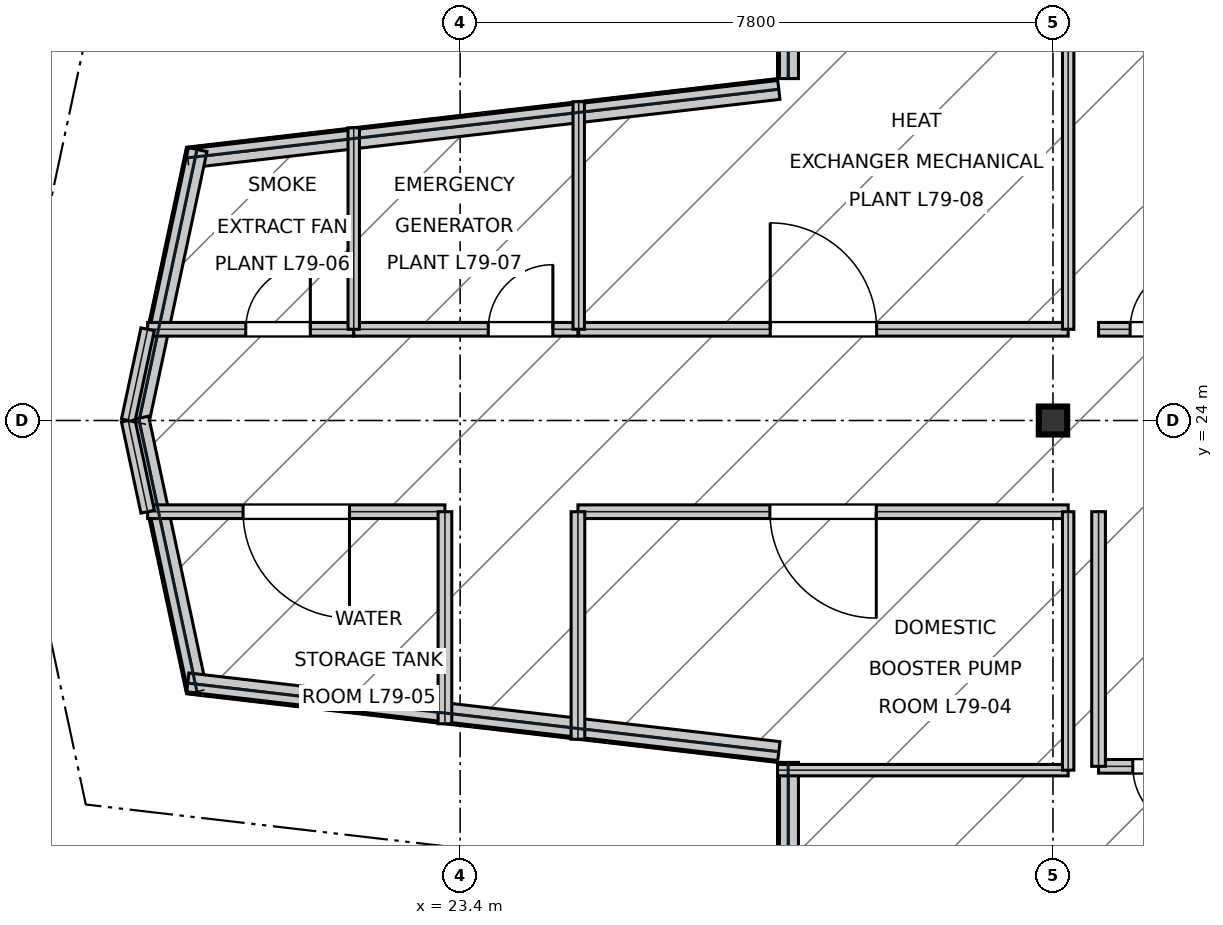
"""IFC4 building model, lengths in metres.
Left out: names, types, materials, properties, quantities, classifications, styles, units other than length and angle.
Written with IfcOpenShell. Run it as: python <this file> out.ifc"""

import sys

from ifc_helpers import new_model, si_unit, direction, frame, frame_2d, origin, origin_2d, place, context, subcontext, project, spatial, rectangle, i_section, extrude, element, fill, save


model = new_model("IFC4")
c1 = context("Model", 3, precision=1e-05, world=origin(), true_north=direction((0.0, 1.0)))
c2 = subcontext(c1, "Body", "Model", "MODEL_VIEW")
j1 = project(units=[si_unit("LENGTHUNIT", "METRE"), si_unit("PLANEANGLEUNIT", "RADIAN")], contexts=[c1])
p1 = place(None, origin())
s1 = spatial("IfcSite", under=j1, at=p1, CompositionType="ELEMENT")
p2 = place(p1, origin())
s2 = spatial("IfcBuilding", under=s1, at=p2, CompositionType="ELEMENT")
p3 = place(p2, frame((0.0, 0.0, 336.9)))
s3 = spatial("IfcBuildingStorey", under=s2, at=p3, CompositionType="ELEMENT", Elevation=336.9)
p4 = place(p3, frame((31.2, 24.0, 0.0), z_axis=(0.0, 0.0, 1.0), x_axis=(1.0, 0.0, 0.0)))
e1 = element("IfcColumn", 1, at=p4, inside=s3, PredefinedType="COLUMN", context=c2, shape_type="SweptSolid", body=[
    extrude(i_section(OverallWidth=0.373, OverallDepth=0.368, WebThickness=0.015, FlangeThickness=0.024, at=origin_2d()), origin(), (0.0, 0.0, 1.0), 4.444),
])
p5 = place(p3, frame((27.726, 32.0, 4.45), z_axis=(0.0, 0.0, 1.0), x_axis=(0.0, -1.0, 0.0)))
e2 = element("IfcWall", 2, at=p5, inside=s3, PredefinedType="PARAPET", context=c2, shape_type="SweptSolid", body=[
    extrude(rectangle(XDim=3.502, YDim=0.25, at=frame_2d((1.751, 0.0))), origin(), (0.0, 0.0, 1.0), 1.1),
])
p6 = place(p3, frame((27.593, 28.349, 4.45), z_axis=(0.0, 0.0, 1.0), x_axis=(-0.993323430456, -0.115362743148, 0.0)))
e3 = element("IfcWall", 3, at=p6, inside=s3, PredefinedType="PARAPET", context=c2, shape_type="SweptSolid", body=[
    extrude(rectangle(XDim=7.828, YDim=0.25, at=frame_2d((3.914, 0.0))), origin(), (0.0, 0.0, 1.0), 1.1),
])
for number, where, z_axis, x_axis in (
    (4, (19.947, 27.564, 4.45), (0.0, 0.0, 1.0), (-0.209, -0.978, 0.0)),
    (5, (19.179, 24.031, 4.45), (0.0, 0.0, 1.0), (0.209, -0.978, 0.0)),
):
    element("IfcWall", number, at=place(p3, frame(where, z_axis=z_axis, x_axis=x_axis)), inside=s3, PredefinedType="PARAPET", context=c2, shape_type="SweptSolid", body=[
        extrude(rectangle(XDim=3.676, YDim=0.25, at=frame_2d((1.838, 0.0))), origin(), (0.0, 0.0, 1.0), 1.1),
    ])
p7 = place(p3, frame((19.817, 20.554, 4.45), z_axis=(0.0, 0.0, 1.0), x_axis=(0.993323430456, -0.115362743148, 0.0)))
e6 = element("IfcWall", 6, at=p7, inside=s3, PredefinedType="PARAPET", context=c2, shape_type="SweptSolid", body=[
    extrude(rectangle(XDim=7.828, YDim=0.25, at=frame_2d((3.914, 0.0))), origin(), (0.0, 0.0, 1.0), 1.1),
])
p8 = place(p3, frame((27.726, 19.502, 4.45), z_axis=(0.0, 0.0, 1.0), x_axis=(0.0, -1.0, 0.0)))
e7 = element("IfcWall", 7, at=p8, inside=s3, PredefinedType="PARAPET", context=c2, shape_type="SweptSolid", body=[
    extrude(rectangle(XDim=3.502, YDim=0.25, at=frame_2d((1.751, 0.0))), origin(), (0.0, 0.0, 1.0), 1.1),
])
p9 = place(p3, frame((31.8, 19.45, 0.0), z_axis=(0.0, 0.0, 1.0), x_axis=(1.0, 0.0, 0.0)))
e8 = element("IfcWall", 8, at=p9, inside=s3, PredefinedType="SOLIDWALL", context=c2, shape_type="SweptSolid", body=[
    extrude(rectangle(XDim=1.75, YDim=0.18, at=frame_2d((0.875, 0.0))), origin(), (0.0, 0.0, 1.0), 4.22),
])
p10 = place(p9, frame((0.45, 0.0, 0.0)))
e9 = element("IfcOpeningElement", 9, at=p10, cuts=e8, PredefinedType="OPENING", context=c2, shape_type="SweptSolid", body=[
    extrude(rectangle(XDim=0.85, YDim=2.15, at=frame_2d((0.425, 1.075))), frame((0.0, 0.1, 0.0), z_axis=(0.0, -1.0, 0.0), x_axis=(1.0, 0.0, 0.0)), (0.0, 0.0, 1.0), 0.2),
])
p11 = place(p3, frame((24.95, 22.8, 0.0), z_axis=(0.0, 0.0, 1.0), x_axis=(1.0, 0.0, 0.0)))
e10 = element("IfcWall", 10, at=p11, inside=s3, PredefinedType="SOLIDWALL", context=c2, shape_type="SweptSolid", body=[
    extrude(rectangle(XDim=6.45, YDim=0.18, at=frame_2d((3.225, 0.0))), origin(), (0.0, 0.0, 1.0), 3.63),
])
p12 = place(p11, frame((2.525, 0.0, 0.0)))
e11 = element("IfcOpeningElement", 11, at=p12, cuts=e10, PredefinedType="OPENING", context=c2, shape_type="SweptSolid", body=[
    extrude(rectangle(XDim=1.4, YDim=2.2, at=frame_2d((0.7, 1.1))), frame((0.0, 0.1, 0.0), z_axis=(0.0, -1.0, 0.0), x_axis=(1.0, 0.0, 0.0)), (0.0, 0.0, 1.0), 0.2),
])
p13 = place(p3, frame((19.288, 22.8, 0.0), z_axis=(0.0, 0.0, 1.0), x_axis=(1.0, 0.0, 0.0)))
e12 = element("IfcWall", 12, at=p13, inside=s3, PredefinedType="SOLIDWALL", context=c2, shape_type="SweptSolid", body=[
    extrude(rectangle(XDim=3.912, YDim=0.18, at=frame_2d((1.956, 0.0))), origin(), (0.0, 0.0, 1.0), 3.9),
])
p14 = place(p13, frame((1.256, 0.0, 0.0)))
e13 = element("IfcOpeningElement", 13, at=p14, cuts=e12, PredefinedType="OPENING", context=c2, shape_type="SweptSolid", body=[
    extrude(rectangle(XDim=1.4, YDim=2.2, at=frame_2d((0.7, 1.1))), frame((0.0, 0.1, 0.0), z_axis=(0.0, -1.0, 0.0), x_axis=(1.0, 0.0, 0.0)), (0.0, 0.0, 1.0), 0.2),
])
p15 = place(p3, frame((19.288, 25.2, 0.0), z_axis=(0.0, 0.0, 1.0), x_axis=(1.0, 0.0, 0.0)))
e14 = element("IfcWall", 14, at=p15, inside=s3, PredefinedType="SOLIDWALL", context=c2, shape_type="SweptSolid", body=[
    extrude(rectangle(XDim=2.712, YDim=0.18, at=frame_2d((1.356, 0.0))), origin(), (0.0, 0.0, 1.0), 4.22),
])
p16 = place(p15, frame((1.291, 0.0, 0.0)))
e15 = element("IfcOpeningElement", 15, at=p16, cuts=e14, PredefinedType="OPENING", context=c2, shape_type="SweptSolid", body=[
    extrude(rectangle(XDim=0.85, YDim=2.15, at=frame_2d((0.425, 1.075))), frame((0.0, 0.1, 0.0), z_axis=(0.0, -1.0, 0.0), x_axis=(1.0, 0.0, 0.0)), (0.0, 0.0, 1.0), 0.2),
])
p17 = place(p3, frame((22.0, 25.2, 0.0), z_axis=(0.0, 0.0, 1.0), x_axis=(1.0, 0.0, 0.0)))
e16 = element("IfcWall", 16, at=p17, inside=s3, PredefinedType="SOLIDWALL", context=c2, shape_type="SweptSolid", body=[
    extrude(rectangle(XDim=2.95, YDim=0.18, at=frame_2d((1.475, 0.0))), origin(), (0.0, 0.0, 1.0), 3.63),
])
p18 = place(p17, frame((1.77, 0.0, 0.0)))
e17 = element("IfcOpeningElement", 17, at=p18, cuts=e16, PredefinedType="OPENING", context=c2, shape_type="SweptSolid", body=[
    extrude(rectangle(XDim=0.85, YDim=2.15, at=frame_2d((0.425, 1.075))), frame((0.0, 0.1, 0.0), z_axis=(0.0, -1.0, 0.0), x_axis=(1.0, 0.0, 0.0)), (0.0, 0.0, 1.0), 0.2),
])
p19 = place(p3, frame((24.96, 25.2, 0.0), z_axis=(0.0, 0.0, 1.0), x_axis=(1.0, 0.0, 0.0)))
e18 = element("IfcWall", 18, at=p19, inside=s3, PredefinedType="SOLIDWALL", context=c2, shape_type="SweptSolid", body=[
    extrude(rectangle(XDim=6.44, YDim=0.18, at=frame_2d((3.22, 0.0))), origin(), (0.0, 0.0, 1.0), 3.63),
])
p20 = place(p19, frame((2.52, 0.0, 0.0)))
e19 = element("IfcOpeningElement", 19, at=p20, cuts=e18, PredefinedType="OPENING", context=c2, shape_type="SweptSolid", body=[
    extrude(rectangle(XDim=1.4, YDim=2.2, at=frame_2d((0.7, 1.1))), frame((0.0, 0.1, 0.0), z_axis=(0.0, -1.0, 0.0), x_axis=(1.0, 0.0, 0.0)), (0.0, 0.0, 1.0), 0.2),
])
p21 = place(p3, frame((31.8, 25.2, 0.0), z_axis=(0.0, 0.0, 1.0), x_axis=(1.0, 0.0, 0.0)))
e20 = element("IfcWall", 20, at=p21, inside=s3, PredefinedType="SOLIDWALL", context=c2, shape_type="SweptSolid", body=[
    extrude(rectangle(XDim=2.4, YDim=0.18, at=frame_2d((1.2, 0.0))), origin(), (0.0, 0.0, 1.0), 4.22),
])
p22 = place(p21, frame((0.415, 0.0, 0.0)))
e21 = element("IfcOpeningElement", 21, at=p22, cuts=e20, PredefinedType="OPENING", context=c2, shape_type="SweptSolid", body=[
    extrude(rectangle(XDim=0.85, YDim=2.15, at=frame_2d((0.425, 1.075))), frame((0.0, 0.1, 0.0), z_axis=(0.0, -1.0, 0.0), x_axis=(1.0, 0.0, 0.0)), (0.0, 0.0, 1.0), 0.2),
])
p23 = place(p3, frame((31.8, 19.45, 0.0), z_axis=(0.0, 0.0, 1.0), x_axis=(0.0, 1.0, 0.0)))
e22 = element("IfcWall", 22, at=p23, inside=s3, PredefinedType="SOLIDWALL", context=c2, shape_type="SweptSolid", body=[
    extrude(rectangle(XDim=3.35, YDim=0.18, at=frame_2d((1.675, 0.0))), origin(), (0.0, 0.0, 1.0), 3.9),
])
p24 = place(p3, frame((24.95, 19.807, 0.0), z_axis=(0.0, 0.0, 1.0), x_axis=(0.0, 1.0, 0.0)))
e23 = element("IfcWall", 23, at=p24, inside=s3, PredefinedType="SOLIDWALL", context=c2, shape_type="SweptSolid", body=[
    extrude(rectangle(XDim=2.993, YDim=0.18, at=frame_2d((1.497, 0.0))), origin(), (0.0, 0.0, 1.0), 3.63),
])
p25 = place(p3, frame((23.2, 20.01, 0.0), z_axis=(0.0, 0.0, 1.0), x_axis=(0.0, 1.0, 0.0)))
e24 = element("IfcWall", 24, at=p25, inside=s3, PredefinedType="SOLIDWALL", context=c2, shape_type="SweptSolid", body=[
    extrude(rectangle(XDim=2.79, YDim=0.18, at=frame_2d((1.395, 0.0))), origin(), (0.0, 0.0, 1.0), 3.63),
])
for number, where, z_axis, x_axis in (
    (25, (19.032, 24.0, 0.0), (0.0, 0.0, 1.0), (0.209, -0.978, 0.0)),
    (26, (19.032, 24.0, 0.0), (0.0, 0.0, 1.0), (0.209, 0.978, 0.0)),
):
    element("IfcWall", number, at=place(p3, frame(where, z_axis=z_axis, x_axis=x_axis)), inside=s3, PredefinedType="SOLIDWALL", context=c2, shape_type="SweptSolid", body=[
        extrude(rectangle(XDim=1.227, YDim=0.18, at=frame_2d((0.614, 0.0))), origin(), (0.0, 0.0, 1.0), 4.22),
    ])
p26 = place(p3, frame((27.576, 19.4, 0.0), z_axis=(0.0, 0.0, 1.0), x_axis=(1.0, 0.0, 0.0)))
e27 = element("IfcWall", 27, at=p26, inside=s3, PredefinedType="MOVABLE", context=c2, shape_type="SweptSolid", body=[
    extrude(rectangle(XDim=3.824, YDim=0.15, at=frame_2d((1.912, 0.0))), origin(), (0.0, 0.0, 1.0), 3.63),
])
p27 = place(p3, frame((31.4, 19.4, 0.0), z_axis=(0.0, 0.0, 1.0), x_axis=(0.0, 1.0, 0.0)))
e28 = element("IfcWall", 28, at=p27, inside=s3, PredefinedType="MOVABLE", context=c2, shape_type="SweptSolid", body=[
    extrude(rectangle(XDim=3.4, YDim=0.15, at=frame_2d((1.7, 0.0))), origin(), (0.0, 0.0, 1.0), 3.63),
])
p28 = place(p3, frame((22.0, 25.2, 0.0), z_axis=(0.0, 0.0, 1.0), x_axis=(0.0, 1.0, 0.0)))
e29 = element("IfcWall", 29, at=p28, inside=s3, PredefinedType="MOVABLE", context=c2, shape_type="SweptSolid", body=[
    extrude(rectangle(XDim=2.651, YDim=0.15, at=frame_2d((1.325, 0.0))), origin(), (0.0, 0.0, 1.0), 3.63),
])
p29 = place(p3, frame((24.96, 25.2, 0.0), z_axis=(0.0, 0.0, 1.0), x_axis=(0.0, 1.0, 0.0)))
e30 = element("IfcWall", 30, at=p29, inside=s3, PredefinedType="MOVABLE", context=c2, shape_type="SweptSolid", body=[
    extrude(rectangle(XDim=2.994, YDim=0.15, at=frame_2d((1.497, 0.0))), origin(), (0.0, 0.0, 1.0), 3.63),
])
p30 = place(p3, frame((31.4, 25.2, 0.0), z_axis=(0.0, 0.0, 1.0), x_axis=(0.0, 1.0, 0.0)))
e31 = element("IfcWall", 31, at=p30, inside=s3, PredefinedType="MOVABLE", context=c2, shape_type="SweptSolid", body=[
    extrude(rectangle(XDim=11.106, YDim=0.15, at=frame_2d((5.553, 0.0))), origin(), (0.0, 0.0, 1.0), 3.63),
])
p31 = place(p10, frame((0.85, 0.0, 0.0), z_axis=(0.0, 0.0, 1.0), x_axis=(-1.0, 0.0, 0.0)))
e32 = element("IfcDoor", 32, at=p31, inside=s3, OperationType="SINGLE_SWING_LEFT", PredefinedType="DOOR", context=c2, shape_type="SweptSolid", body=[
    extrude(rectangle(XDim=0.85, YDim=2.15, at=frame_2d((0.425, 1.075))), frame((0.0, 0.025, 0.0), z_axis=(0.0, -1.0, 0.0), x_axis=(1.0, 0.0, 0.0)), (0.0, 0.0, 1.0), 0.05),
])
fill(e9, e32)
p32 = place(p12, frame((1.4, 0.0, 0.0), z_axis=(0.0, 0.0, 1.0), x_axis=(-1.0, 0.0, 0.0)))
e33 = element("IfcDoor", 33, at=p32, inside=s3, OperationType="SINGLE_SWING_LEFT", PredefinedType="DOOR", context=c2, shape_type="SweptSolid", body=[
    extrude(rectangle(XDim=1.4, YDim=2.2, at=frame_2d((0.7, 1.1))), frame((0.0, 0.025, 0.0), z_axis=(0.0, -1.0, 0.0), x_axis=(1.0, 0.0, 0.0)), (0.0, 0.0, 1.0), 0.05),
])
fill(e11, e33)
p33 = place(p14, frame((1.4, 0.0, 0.0), z_axis=(0.0, 0.0, 1.0), x_axis=(-1.0, 0.0, 0.0)))
e34 = element("IfcDoor", 34, at=p33, inside=s3, OperationType="SINGLE_SWING_LEFT", PredefinedType="DOOR", context=c2, shape_type="SweptSolid", body=[
    extrude(rectangle(XDim=1.4, YDim=2.2, at=frame_2d((0.7, 1.1))), frame((0.0, 0.025, 0.0), z_axis=(0.0, -1.0, 0.0), x_axis=(1.0, 0.0, 0.0)), (0.0, 0.0, 1.0), 0.05),
])
fill(e13, e34)
p34 = place(p16, origin())
e35 = element("IfcDoor", 35, at=p34, inside=s3, OperationType="SINGLE_SWING_RIGHT", PredefinedType="DOOR", context=c2, shape_type="SweptSolid", body=[
    extrude(rectangle(XDim=0.85, YDim=2.15, at=frame_2d((0.425, 1.075))), frame((0.0, 0.025, 0.0), z_axis=(0.0, -1.0, 0.0), x_axis=(1.0, 0.0, 0.0)), (0.0, 0.0, 1.0), 0.05),
])
fill(e15, e35)
p35 = place(p18, origin())
e36 = element("IfcDoor", 36, at=p35, inside=s3, OperationType="SINGLE_SWING_RIGHT", PredefinedType="DOOR", context=c2, shape_type="SweptSolid", body=[
    extrude(rectangle(XDim=0.85, YDim=2.15, at=frame_2d((0.425, 1.075))), frame((0.0, 0.025, 0.0), z_axis=(0.0, -1.0, 0.0), x_axis=(1.0, 0.0, 0.0)), (0.0, 0.0, 1.0), 0.05),
])
fill(e17, e36)
p36 = place(p20, origin())
e37 = element("IfcDoor", 37, at=p36, inside=s3, OperationType="SINGLE_SWING_LEFT", PredefinedType="DOOR", context=c2, shape_type="SweptSolid", body=[
    extrude(rectangle(XDim=1.4, YDim=2.2, at=frame_2d((0.7, 1.1))), frame((0.0, 0.025, 0.0), z_axis=(0.0, -1.0, 0.0), x_axis=(1.0, 0.0, 0.0)), (0.0, 0.0, 1.0), 0.05),
])
fill(e19, e37)
p37 = place(p22, origin())
e38 = element("IfcDoor", 38, at=p37, inside=s3, OperationType="SINGLE_SWING_RIGHT", PredefinedType="DOOR", context=c2, shape_type="SweptSolid", body=[
    extrude(rectangle(XDim=0.85, YDim=2.15, at=frame_2d((0.425, 1.075))), frame((0.0, 0.025, 0.0), z_axis=(0.0, -1.0, 0.0), x_axis=(1.0, 0.0, 0.0)), (0.0, 0.0, 1.0), 0.05),
])
fill(e21, e38)
save(model, sys.argv[1])
